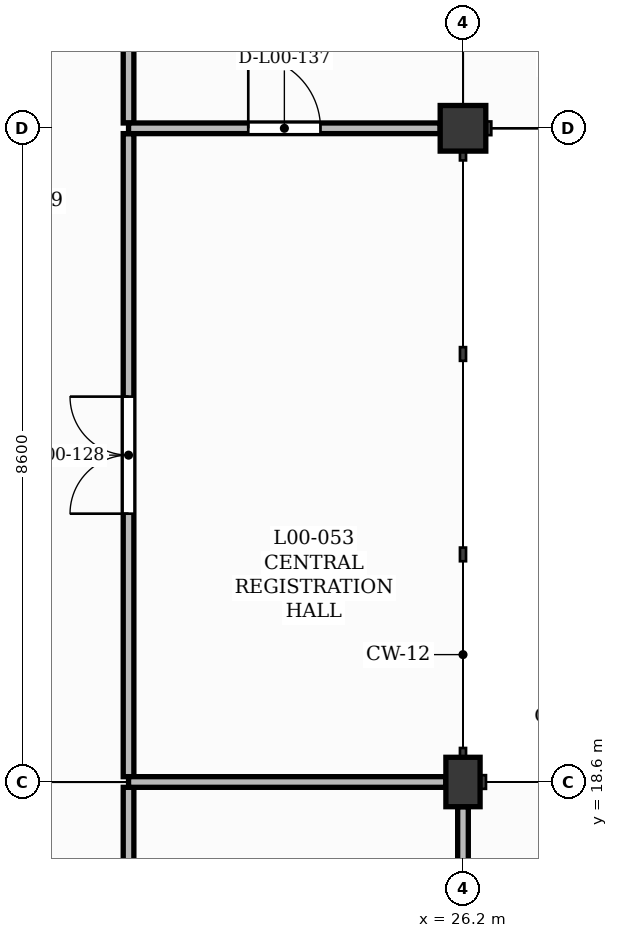
"""IFC4 building model, lengths in metres.
Left out: names, types, materials, properties, quantities, classifications, styles, units other than length and angle.
Written with IfcOpenShell. Run it as: python <this file> out.ifc"""

import sys

from ifc_helpers import new_model, si_unit, direction, frame, frame_2d, origin, origin_2d, place, context, subcontext, project, spatial, rectangle, extrude, element, fill, save


model = new_model("IFC4")
c1 = context("Model", 3, precision=1e-05, world=origin(), true_north=direction((0.0, 1.0)))
c2 = subcontext(c1, "Body", "Model", "MODEL_VIEW")
j1 = project(units=[si_unit("LENGTHUNIT", "METRE"), si_unit("PLANEANGLEUNIT", "RADIAN")], contexts=[c1])
p1 = place(None, origin())
s1 = spatial("IfcSite", under=j1, at=p1, CompositionType="ELEMENT")
p2 = place(p1, origin())
s2 = spatial("IfcBuilding", under=s1, at=p2, CompositionType="ELEMENT")
p3 = place(p2, origin())
s3 = spatial("IfcBuildingStorey", under=s2, at=p3, CompositionType="ELEMENT", Elevation=0.0)
p4 = place(p3, frame((26.2, 18.6, 0.0), z_axis=(0.0, 0.0, 1.0), x_axis=(1.0, 0.0, 0.0)))
e1 = element("IfcColumn", 1, at=p4, inside=s3, PredefinedType="COLUMN", context=c2, shape_type="SweptSolid", body=[
    extrude(rectangle(XDim=0.45, YDim=0.65, at=origin_2d()), origin(), (0.0, 0.0, 1.0), 4.2),
])
p5 = place(p3, frame((26.2, 27.2, 0.0), z_axis=(0.0, 0.0, 1.0), x_axis=(1.0, 0.0, 0.0)))
e2 = element("IfcColumn", 2, at=p5, inside=s3, PredefinedType="COLUMN", context=c2, shape_type="SweptSolid", body=[
    extrude(rectangle(XDim=0.6, YDim=0.6, at=origin_2d()), origin(), (0.0, 0.0, 1.0), 4.2),
])
p6 = place(p3, frame((21.8, 13.47, 0.0), z_axis=(0.0, 0.0, 1.0), x_axis=(0.0, 1.0, 0.0)))
e3 = element("IfcWall", 3, at=p6, inside=s3, PredefinedType="PARTITIONING", context=c2, shape_type="SweptSolid", body=[
    extrude(rectangle(XDim=5.06, YDim=0.14, at=frame_2d((2.53, 0.0))), origin(), (0.0, 0.0, 1.0), 4.18),
])
p7 = place(p6, frame((2.0, 0.0, 0.0)))
e4 = element("IfcOpeningElement", 4, at=p7, cuts=e3, PredefinedType="OPENING", context=c2, shape_type="SweptSolid", body=[
    extrude(rectangle(XDim=1.06, YDim=2.15, at=frame_2d((0.53, 1.075))), frame((0.0, 0.08, 0.0), z_axis=(0.0, -1.0, 0.0), x_axis=(1.0, 0.0, 0.0)), (0.0, 0.0, 1.0), 0.16),
])
p8 = place(p3, frame((21.8, 18.67, 0.0), z_axis=(0.0, 0.0, 1.0), x_axis=(0.0, 1.0, 0.0)))
e5 = element("IfcWall", 5, at=p8, inside=s3, PredefinedType="PARTITIONING", context=c2, shape_type="SweptSolid", body=[
    extrude(rectangle(XDim=8.46, YDim=0.14, at=frame_2d((4.23, 0.0))), origin(), (0.0, 0.0, 1.0), 4.18),
])
p9 = place(p8, frame((3.46, 0.0, 0.0)))
e6 = element("IfcOpeningElement", 6, at=p9, cuts=e5, PredefinedType="OPENING", context=c2, shape_type="SweptSolid", body=[
    extrude(rectangle(XDim=1.54, YDim=2.25, at=frame_2d((0.77, 1.125))), frame((0.0, 0.08, 0.0), z_axis=(0.0, -1.0, 0.0), x_axis=(1.0, 0.0, 0.0)), (0.0, 0.0, 1.0), 0.16),
])
p10 = place(p3, frame((21.8, 18.6, 0.0), z_axis=(0.0, 0.0, 1.0), x_axis=(1.0, 0.0, 0.0)))
e7 = element("IfcWall", 7, at=p10, inside=s3, PredefinedType="PARTITIONING", context=c2, shape_type="SweptSolid", body=[
    extrude(rectangle(XDim=4.175, YDim=0.14, at=frame_2d((2.087, 0.0))), origin(), (0.0, 0.0, 1.0), 3.25),
])
p11 = place(p3, frame((21.8, 27.27, 0.0), z_axis=(0.0, 0.0, 1.0), x_axis=(0.0, 1.0, 0.0)))
e8 = element("IfcWall", 8, at=p11, inside=s3, PredefinedType="PARTITIONING", context=c2, shape_type="SweptSolid", body=[
    extrude(rectangle(XDim=9.46, YDim=0.14, at=frame_2d((4.73, 0.0))), origin(), (0.0, 0.0, 1.0), 4.18),
])
p12 = place(p11, frame((3.9, 0.0, 0.0)))
e9 = element("IfcOpeningElement", 9, at=p12, cuts=e8, PredefinedType="OPENING", context=c2, shape_type="SweptSolid", body=[
    extrude(rectangle(XDim=1.66, YDim=2.3, at=frame_2d((0.83, 1.15))), frame((0.0, 0.08, 0.0), z_axis=(0.0, -1.0, 0.0), x_axis=(1.0, 0.0, 0.0)), (0.0, 0.0, 1.0), 0.16),
])
p13 = place(p3, frame((21.8, 27.2, 0.0), z_axis=(0.0, 0.0, 1.0), x_axis=(1.0, 0.0, 0.0)))
e10 = element("IfcWall", 10, at=p13, inside=s3, PredefinedType="PARTITIONING", context=c2, shape_type="SweptSolid", body=[
    extrude(rectangle(XDim=4.1, YDim=0.14, at=frame_2d((2.05, 0.0))), origin(), (0.0, 0.0, 1.0), 3.6),
])
p14 = place(p13, frame((1.575, 0.0, 0.0)))
e11 = element("IfcOpeningElement", 11, at=p14, cuts=e10, PredefinedType="OPENING", context=c2, shape_type="SweptSolid", body=[
    extrude(rectangle(XDim=0.95, YDim=2.1, at=frame_2d((0.475, 1.05))), frame((0.0, 0.08, 0.0), z_axis=(0.0, -1.0, 0.0), x_axis=(1.0, 0.0, 0.0)), (0.0, 0.0, 1.0), 0.16),
])
p15 = place(p3, frame((26.2, 13.47, 0.0), z_axis=(0.0, 0.0, 1.0), x_axis=(0.0, 1.0, 0.0)))
e12 = element("IfcWall", 12, at=p15, inside=s3, PredefinedType="PARTITIONING", context=c2, shape_type="SweptSolid", body=[
    extrude(rectangle(XDim=4.805, YDim=0.14, at=frame_2d((2.402, 0.0))), origin(), (0.0, 0.0, 1.0), 3.5),
])
p16 = place(p9, origin())
e13 = element("IfcDoor", 13, at=p16, inside=s3, OperationType="DOUBLE_DOOR_SINGLE_SWING", PredefinedType="DOOR", context=c2, shape_type="SweptSolid", body=[
    extrude(rectangle(XDim=1.54, YDim=2.25, at=frame_2d((0.77, 1.125))), frame((0.0, 0.025, 0.0), z_axis=(0.0, -1.0, 0.0), x_axis=(1.0, 0.0, 0.0)), (0.0, 0.0, 1.0), 0.05),
])
fill(e6, e13)
p17 = place(p14, origin())
e14 = element("IfcDoor", 14, at=p17, inside=s3, OperationType="SINGLE_SWING_LEFT", PredefinedType="DOOR", context=c2, shape_type="SweptSolid", body=[
    extrude(rectangle(XDim=0.95, YDim=2.1, at=frame_2d((0.475, 1.05))), frame((0.0, 0.025, 0.0), z_axis=(0.0, -1.0, 0.0), x_axis=(1.0, 0.0, 0.0)), (0.0, 0.0, 1.0), 0.05),
])
fill(e11, e14)
save(model, sys.argv[1])
